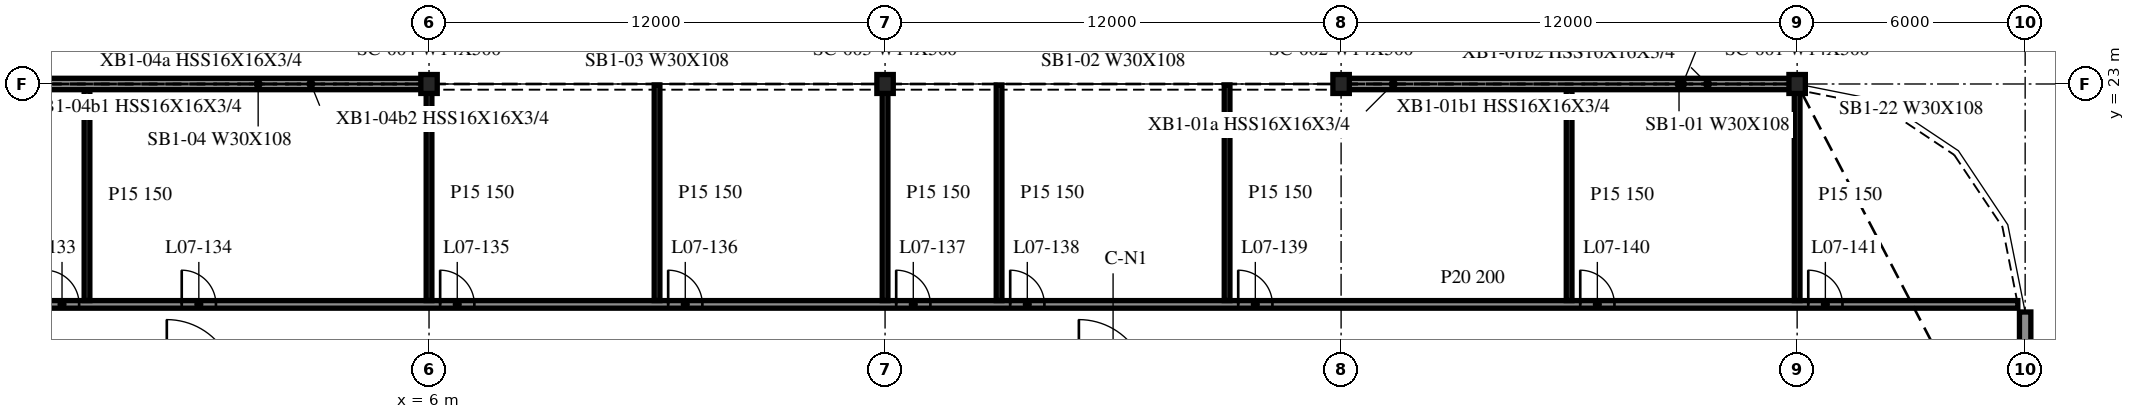
"""IFC4 building model, lengths in metres.
Left out: names, types, materials, properties, quantities, classifications, styles, units other than length and angle.
Written with IfcOpenShell. Run it as: python <this file> out.ifc"""

import sys

from ifc_helpers import new_model, si_unit, direction, frame, frame_2d, origin, origin_2d, place, context, subcontext, project, spatial, rectangle, i_section, extrude, element, fill, save


model = new_model("IFC4")
c1 = context("Model", 3, precision=1e-05, world=origin(), true_north=direction((0.0, 1.0)))
c2 = subcontext(c1, "Body", "Model", "MODEL_VIEW")
j1 = project(units=[si_unit("LENGTHUNIT", "METRE"), si_unit("PLANEANGLEUNIT", "RADIAN")], contexts=[c1])
p1 = place(None, origin())
s1 = spatial("IfcSite", under=j1, at=p1, CompositionType="ELEMENT")
p2 = place(p1, origin())
s2 = spatial("IfcBuilding", under=s1, at=p2, CompositionType="ELEMENT")
p3 = place(p2, frame((0.0, 0.0, 33.0)))
s3 = spatial("IfcBuildingStorey", under=s2, at=p3, CompositionType="ELEMENT", Elevation=33.0)
for number, where, z_axis, x_axis in (
    (1, (42.0, 23.0, -0.34), (0.0, 0.0, 1.0), (1.0, 0.0, 0.0)),
    (2, (30.0, 23.0, -0.34), (0.0, 0.0, 1.0), (1.0, 0.0, 0.0)),
    (3, (18.0, 23.0, -0.34), (0.0, 0.0, 1.0), (1.0, 0.0, 0.0)),
    (4, (6.0, 23.0, -0.34), (0.0, 0.0, 1.0), (1.0, 0.0, 0.0)),
):
    element("IfcColumn", number, at=place(p3, frame(where, z_axis=z_axis, x_axis=x_axis)), inside=s3, PredefinedType="COLUMN", context=c2, shape_type="SweptSolid", body=[
        extrude(i_section(OverallWidth=0.432, OverallDepth=0.498, WebThickness=0.056, FlangeThickness=0.089, at=origin_2d()), origin(), (0.0, 0.0, 1.0), 4.3),
    ])
for number, where, z_axis, x_axis in (
    (5, (41.972, 23.0, 0.0), (0.0, 0.0, 1.0), (-1.0, 0.0, 0.0)),
    (6, (5.972, 23.0, 0.0), (0.0, 0.0, 1.0), (-1.0, 0.0, 0.0)),
):
    element("IfcWall", number, at=place(p3, frame(where, z_axis=z_axis, x_axis=x_axis)), inside=s3, PredefinedType="NOTDEFINED", context=c2, shape_type="SweptSolid", body=[
        extrude(rectangle(XDim=11.944, YDim=0.3, at=frame_2d((5.972, 0.0))), origin(), (0.0, 0.0, 1.0), 3.203),
    ])
p4 = place(p3, frame((48.0, 11.749, 0.0), z_axis=(0.0, 0.0, 1.0), x_axis=(0.0, 1.0, 0.0)))
e7 = element("IfcWall", 7, at=p4, inside=s3, PredefinedType="NOTDEFINED", context=c2, shape_type="SweptSolid", body=[
    extrude(rectangle(XDim=5.251, YDim=0.3, at=frame_2d((2.625, 0.0))), origin(), (0.0, 0.0, 1.0), 3.203),
])
p5 = place(p3, frame((-47.807, 17.2, 0.0), z_axis=(0.0, 0.0, 1.0), x_axis=(1.0, 0.0, 0.0)))
e8 = element("IfcWall", 8, at=p5, inside=s3, PredefinedType="PARTITIONING", context=c2, shape_type="SweptSolid", body=[
    extrude(rectangle(XDim=95.615, YDim=0.2, at=frame_2d((47.807, 0.0))), origin(), (0.0, 0.0, 1.0), 3.96),
])
p6 = place(p5, frame((4.7, 0.0, 0.0)))
e9 = element("IfcOpeningElement", 9, at=p6, cuts=e8, PredefinedType="OPENING", context=c2, shape_type="SweptSolid", body=[
    extrude(rectangle(XDim=0.9, YDim=2.1, at=frame_2d((0.45, 1.05))), frame((0.0, 0.11, 0.0), z_axis=(0.0, -1.0, 0.0), x_axis=(1.0, 0.0, 0.0)), (0.0, 0.0, 1.0), 0.22),
])
p7 = place(p5, frame((8.1, 0.0, 0.0)))
e10 = element("IfcOpeningElement", 10, at=p7, cuts=e8, PredefinedType="OPENING", context=c2, shape_type="SweptSolid", body=[
    extrude(rectangle(XDim=0.9, YDim=2.1, at=frame_2d((0.45, 1.05))), frame((0.0, 0.11, 0.0), z_axis=(0.0, -1.0, 0.0), x_axis=(1.0, 0.0, 0.0)), (0.0, 0.0, 1.0), 0.22),
])
p8 = place(p5, frame((14.1, 0.0, 0.0)))
e11 = element("IfcOpeningElement", 11, at=p8, cuts=e8, PredefinedType="OPENING", context=c2, shape_type="SweptSolid", body=[
    extrude(rectangle(XDim=0.9, YDim=2.1, at=frame_2d((0.45, 1.05))), frame((0.0, 0.11, 0.0), z_axis=(0.0, -1.0, 0.0), x_axis=(1.0, 0.0, 0.0)), (0.0, 0.0, 1.0), 0.22),
])
p9 = place(p5, frame((22.7, 0.0, 0.0)))
e12 = element("IfcOpeningElement", 12, at=p9, cuts=e8, PredefinedType="OPENING", context=c2, shape_type="SweptSolid", body=[
    extrude(rectangle(XDim=0.9, YDim=2.1, at=frame_2d((0.45, 1.05))), frame((0.0, 0.11, 0.0), z_axis=(0.0, -1.0, 0.0), x_axis=(1.0, 0.0, 0.0)), (0.0, 0.0, 1.0), 0.22),
])
p10 = place(p5, frame((28.7, 0.0, 0.0)))
e13 = element("IfcOpeningElement", 13, at=p10, cuts=e8, PredefinedType="OPENING", context=c2, shape_type="SweptSolid", body=[
    extrude(rectangle(XDim=0.9, YDim=2.1, at=frame_2d((0.45, 1.05))), frame((0.0, 0.11, 0.0), z_axis=(0.0, -1.0, 0.0), x_axis=(1.0, 0.0, 0.0)), (0.0, 0.0, 1.0), 0.22),
])
p11 = place(p5, frame((34.7, 0.0, 0.0)))
e14 = element("IfcOpeningElement", 14, at=p11, cuts=e8, PredefinedType="OPENING", context=c2, shape_type="SweptSolid", body=[
    extrude(rectangle(XDim=0.9, YDim=2.1, at=frame_2d((0.45, 1.05))), frame((0.0, 0.11, 0.0), z_axis=(0.0, -1.0, 0.0), x_axis=(1.0, 0.0, 0.0)), (0.0, 0.0, 1.0), 0.22),
])
p12 = place(p5, frame((38.1, 0.0, 0.0)))
e15 = element("IfcOpeningElement", 15, at=p12, cuts=e8, PredefinedType="OPENING", context=c2, shape_type="SweptSolid", body=[
    extrude(rectangle(XDim=0.9, YDim=2.1, at=frame_2d((0.45, 1.05))), frame((0.0, 0.11, 0.0), z_axis=(0.0, -1.0, 0.0), x_axis=(1.0, 0.0, 0.0)), (0.0, 0.0, 1.0), 0.22),
])
p13 = place(p5, frame((43.7, 0.0, 0.0)))
e16 = element("IfcOpeningElement", 16, at=p13, cuts=e8, PredefinedType="OPENING", context=c2, shape_type="SweptSolid", body=[
    extrude(rectangle(XDim=0.9, YDim=2.1, at=frame_2d((0.45, 1.05))), frame((0.0, 0.11, 0.0), z_axis=(0.0, -1.0, 0.0), x_axis=(1.0, 0.0, 0.0)), (0.0, 0.0, 1.0), 0.22),
])
p14 = place(p5, frame((47.3, 0.0, 0.0)))
e17 = element("IfcOpeningElement", 17, at=p14, cuts=e8, PredefinedType="OPENING", context=c2, shape_type="SweptSolid", body=[
    extrude(rectangle(XDim=0.9, YDim=2.1, at=frame_2d((0.45, 1.05))), frame((0.0, 0.11, 0.0), z_axis=(0.0, -1.0, 0.0), x_axis=(1.0, 0.0, 0.0)), (0.0, 0.0, 1.0), 0.22),
])
p15 = place(p5, frame((54.1, 0.0, 0.0)))
e18 = element("IfcOpeningElement", 18, at=p15, cuts=e8, PredefinedType="OPENING", context=c2, shape_type="SweptSolid", body=[
    extrude(rectangle(XDim=0.9, YDim=2.1, at=frame_2d((0.45, 1.05))), frame((0.0, 0.11, 0.0), z_axis=(0.0, -1.0, 0.0), x_axis=(1.0, 0.0, 0.0)), (0.0, 0.0, 1.0), 0.22),
])
p16 = place(p5, frame((60.1, 0.0, 0.0)))
e19 = element("IfcOpeningElement", 19, at=p16, cuts=e8, PredefinedType="OPENING", context=c2, shape_type="SweptSolid", body=[
    extrude(rectangle(XDim=0.9, YDim=2.1, at=frame_2d((0.45, 1.05))), frame((0.0, 0.11, 0.0), z_axis=(0.0, -1.0, 0.0), x_axis=(1.0, 0.0, 0.0)), (0.0, 0.0, 1.0), 0.22),
])
p17 = place(p5, frame((66.1, 0.0, 0.0)))
e20 = element("IfcOpeningElement", 20, at=p17, cuts=e8, PredefinedType="OPENING", context=c2, shape_type="SweptSolid", body=[
    extrude(rectangle(XDim=0.9, YDim=2.1, at=frame_2d((0.45, 1.05))), frame((0.0, 0.11, 0.0), z_axis=(0.0, -1.0, 0.0), x_axis=(1.0, 0.0, 0.0)), (0.0, 0.0, 1.0), 0.22),
])
p18 = place(p5, frame((69.1, 0.0, 0.0)))
e21 = element("IfcOpeningElement", 21, at=p18, cuts=e8, PredefinedType="OPENING", context=c2, shape_type="SweptSolid", body=[
    extrude(rectangle(XDim=0.9, YDim=2.1, at=frame_2d((0.45, 1.05))), frame((0.0, 0.11, 0.0), z_axis=(0.0, -1.0, 0.0), x_axis=(1.0, 0.0, 0.0)), (0.0, 0.0, 1.0), 0.22),
])
p19 = place(p5, frame((75.1, 0.0, 0.0)))
e22 = element("IfcOpeningElement", 22, at=p19, cuts=e8, PredefinedType="OPENING", context=c2, shape_type="SweptSolid", body=[
    extrude(rectangle(XDim=0.9, YDim=2.1, at=frame_2d((0.45, 1.05))), frame((0.0, 0.11, 0.0), z_axis=(0.0, -1.0, 0.0), x_axis=(1.0, 0.0, 0.0)), (0.0, 0.0, 1.0), 0.22),
])
p20 = place(p5, frame((84.1, 0.0, 0.0)))
e23 = element("IfcOpeningElement", 23, at=p20, cuts=e8, PredefinedType="OPENING", context=c2, shape_type="SweptSolid", body=[
    extrude(rectangle(XDim=0.9, YDim=2.1, at=frame_2d((0.45, 1.05))), frame((0.0, 0.11, 0.0), z_axis=(0.0, -1.0, 0.0), x_axis=(1.0, 0.0, 0.0)), (0.0, 0.0, 1.0), 0.22),
])
p21 = place(p5, frame((90.1, 0.0, 0.0)))
e24 = element("IfcOpeningElement", 24, at=p21, cuts=e8, PredefinedType="OPENING", context=c2, shape_type="SweptSolid", body=[
    extrude(rectangle(XDim=0.9, YDim=2.1, at=frame_2d((0.45, 1.05))), frame((0.0, 0.11, 0.0), z_axis=(0.0, -1.0, 0.0), x_axis=(1.0, 0.0, 0.0)), (0.0, 0.0, 1.0), 0.22),
])
p22 = place(p3, frame((-3.0, 17.3, 0.0), z_axis=(0.0, 0.0, 1.0), x_axis=(0.0, 1.0, 0.0)))
e25 = element("IfcWall", 25, at=p22, inside=s3, PredefinedType="PARTITIONING", context=c2, shape_type="SweptSolid", body=[
    extrude(rectangle(XDim=5.55, YDim=0.15, at=frame_2d((2.775, 0.0))), origin(), (0.0, 0.0, 1.0), 3.96),
])
for number, where, z_axis, x_axis in (
    (26, (6.0, 17.3, 0.0), (0.0, 0.0, 1.0), (0.0, 1.0, 0.0)),
    (27, (12.0, 17.3, 0.0), (0.0, 0.0, 1.0), (0.0, 1.0, 0.0)),
    (28, (18.0, 17.3, 0.0), (0.0, 0.0, 1.0), (0.0, 1.0, 0.0)),
    (29, (21.0, 17.3, 0.0), (0.0, 0.0, 1.0), (0.0, 1.0, 0.0)),
    (30, (27.0, 17.3, 0.0), (0.0, 0.0, 1.0), (0.0, 1.0, 0.0)),
):
    element("IfcWall", number, at=place(p3, frame(where, z_axis=z_axis, x_axis=x_axis)), inside=s3, PredefinedType="PARTITIONING", context=c2, shape_type="SweptSolid", body=[
        extrude(rectangle(XDim=5.675, YDim=0.15, at=frame_2d((2.837, 0.0))), origin(), (0.0, 0.0, 1.0), 3.96),
    ])
p23 = place(p3, frame((36.0, 17.3, 0.0), z_axis=(0.0, 0.0, 1.0), x_axis=(0.0, 1.0, 0.0)))
e31 = element("IfcWall", 31, at=p23, inside=s3, PredefinedType="PARTITIONING", context=c2, shape_type="SweptSolid", body=[
    extrude(rectangle(XDim=5.55, YDim=0.15, at=frame_2d((2.775, 0.0))), origin(), (0.0, 0.0, 1.0), 3.96),
])
p24 = place(p3, frame((42.0, 17.3, 0.0), z_axis=(0.0, 0.0, 1.0), x_axis=(0.0, 1.0, 0.0)))
e32 = element("IfcWall", 32, at=p24, inside=s3, PredefinedType="PARTITIONING", context=c2, shape_type="SweptSolid", body=[
    extrude(rectangle(XDim=5.547, YDim=0.15, at=frame_2d((2.773, 0.0))), origin(), (0.0, 0.0, 1.0), 3.96),
])
p25 = place(p13, origin())
e33 = element("IfcDoor", 33, at=p25, inside=s3, OperationType="SINGLE_SWING_LEFT", PredefinedType="DOOR", context=c2, shape_type="SweptSolid", body=[
    extrude(rectangle(XDim=0.9, YDim=2.1, at=frame_2d((0.45, 1.05))), frame((0.0, 0.025, 0.0), z_axis=(0.0, -1.0, 0.0), x_axis=(1.0, 0.0, 0.0)), (0.0, 0.0, 1.0), 0.05),
])
fill(e16, e33)
p26 = place(p14, origin())
e34 = element("IfcDoor", 34, at=p26, inside=s3, OperationType="SINGLE_SWING_LEFT", PredefinedType="DOOR", context=c2, shape_type="SweptSolid", body=[
    extrude(rectangle(XDim=0.9, YDim=2.1, at=frame_2d((0.45, 1.05))), frame((0.0, 0.025, 0.0), z_axis=(0.0, -1.0, 0.0), x_axis=(1.0, 0.0, 0.0)), (0.0, 0.0, 1.0), 0.05),
])
fill(e17, e34)
p27 = place(p15, origin())
e35 = element("IfcDoor", 35, at=p27, inside=s3, OperationType="SINGLE_SWING_RIGHT", PredefinedType="DOOR", context=c2, shape_type="SweptSolid", body=[
    extrude(rectangle(XDim=0.9, YDim=2.1, at=frame_2d((0.45, 1.05))), frame((0.0, 0.025, 0.0), z_axis=(0.0, -1.0, 0.0), x_axis=(1.0, 0.0, 0.0)), (0.0, 0.0, 1.0), 0.05),
])
fill(e18, e35)
p28 = place(p16, origin())
e36 = element("IfcDoor", 36, at=p28, inside=s3, OperationType="SINGLE_SWING_RIGHT", PredefinedType="DOOR", context=c2, shape_type="SweptSolid", body=[
    extrude(rectangle(XDim=0.9, YDim=2.1, at=frame_2d((0.45, 1.05))), frame((0.0, 0.025, 0.0), z_axis=(0.0, -1.0, 0.0), x_axis=(1.0, 0.0, 0.0)), (0.0, 0.0, 1.0), 0.05),
])
fill(e19, e36)
p29 = place(p17, origin())
e37 = element("IfcDoor", 37, at=p29, inside=s3, OperationType="SINGLE_SWING_RIGHT", PredefinedType="DOOR", context=c2, shape_type="SweptSolid", body=[
    extrude(rectangle(XDim=0.9, YDim=2.1, at=frame_2d((0.45, 1.05))), frame((0.0, 0.025, 0.0), z_axis=(0.0, -1.0, 0.0), x_axis=(1.0, 0.0, 0.0)), (0.0, 0.0, 1.0), 0.05),
])
fill(e20, e37)
p30 = place(p18, origin())
e38 = element("IfcDoor", 38, at=p30, inside=s3, OperationType="SINGLE_SWING_RIGHT", PredefinedType="DOOR", context=c2, shape_type="SweptSolid", body=[
    extrude(rectangle(XDim=0.9, YDim=2.1, at=frame_2d((0.45, 1.05))), frame((0.0, 0.025, 0.0), z_axis=(0.0, -1.0, 0.0), x_axis=(1.0, 0.0, 0.0)), (0.0, 0.0, 1.0), 0.05),
])
fill(e21, e38)
p31 = place(p19, origin())
e39 = element("IfcDoor", 39, at=p31, inside=s3, OperationType="SINGLE_SWING_RIGHT", PredefinedType="DOOR", context=c2, shape_type="SweptSolid", body=[
    extrude(rectangle(XDim=0.9, YDim=2.1, at=frame_2d((0.45, 1.05))), frame((0.0, 0.025, 0.0), z_axis=(0.0, -1.0, 0.0), x_axis=(1.0, 0.0, 0.0)), (0.0, 0.0, 1.0), 0.05),
])
fill(e22, e39)
p32 = place(p20, origin())
e40 = element("IfcDoor", 40, at=p32, inside=s3, OperationType="SINGLE_SWING_RIGHT", PredefinedType="DOOR", context=c2, shape_type="SweptSolid", body=[
    extrude(rectangle(XDim=0.9, YDim=2.1, at=frame_2d((0.45, 1.05))), frame((0.0, 0.025, 0.0), z_axis=(0.0, -1.0, 0.0), x_axis=(1.0, 0.0, 0.0)), (0.0, 0.0, 1.0), 0.05),
])
fill(e23, e40)
p33 = place(p21, origin())
e41 = element("IfcDoor", 41, at=p33, inside=s3, OperationType="SINGLE_SWING_RIGHT", PredefinedType="DOOR", context=c2, shape_type="SweptSolid", body=[
    extrude(rectangle(XDim=0.9, YDim=2.1, at=frame_2d((0.45, 1.05))), frame((0.0, 0.025, 0.0), z_axis=(0.0, -1.0, 0.0), x_axis=(1.0, 0.0, 0.0)), (0.0, 0.0, 1.0), 0.05),
])
fill(e24, e41)
save(model, sys.argv[1])
